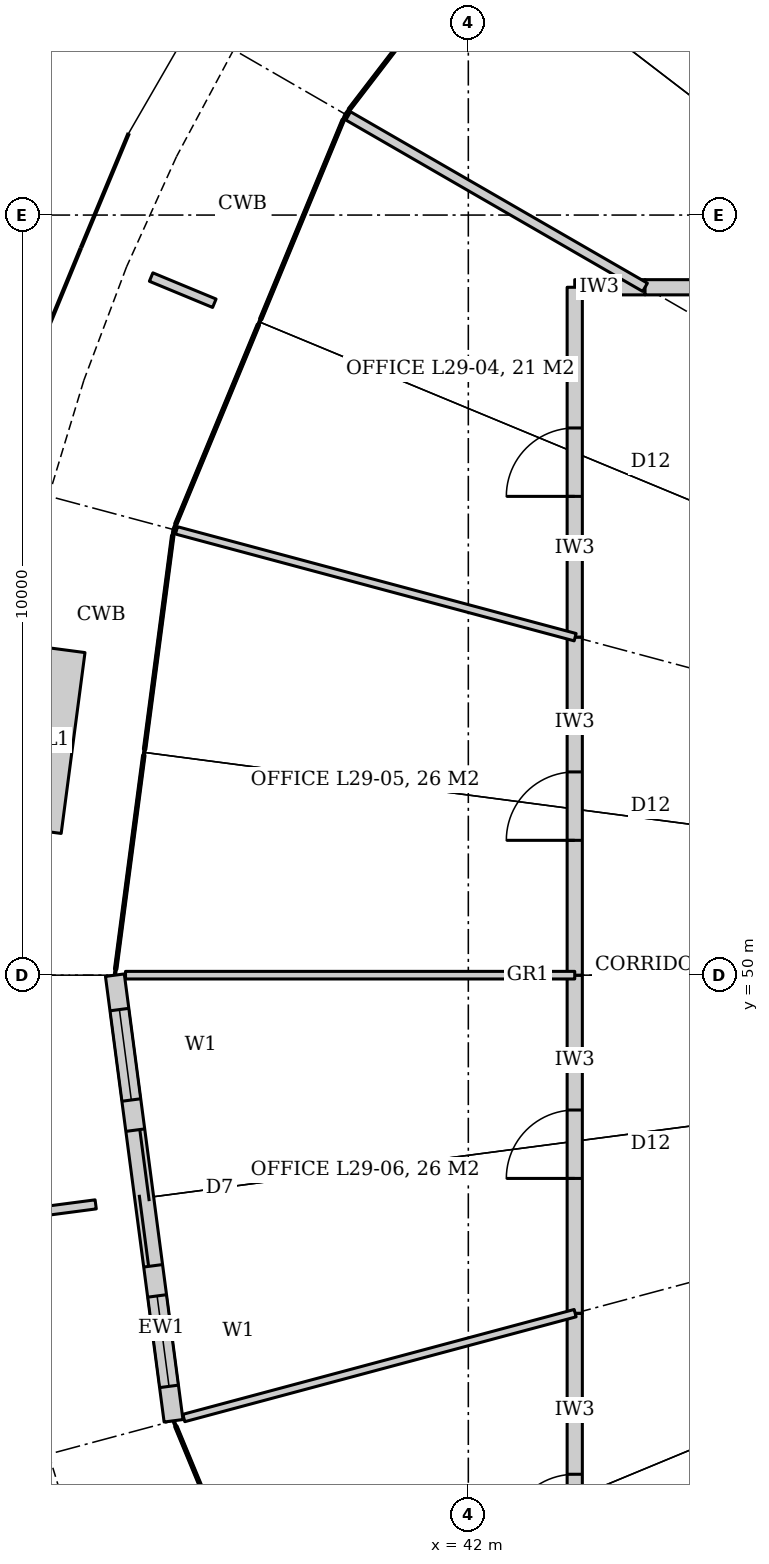
"""IFC4 building model, lengths in metres.
Left out: names, types, materials, properties, quantities, classifications, styles, units other than length and angle.
Written with IfcOpenShell. Run it as: python <this file> out.ifc"""

import sys

from ifc_helpers import new_model, si_unit, direction, frame, frame_2d, origin, place, context, subcontext, project, spatial, rectangle, extrude, element, fill, save


model = new_model("IFC4")
c1 = context("Model", 3, precision=1e-05, world=origin(), true_north=direction((0.0, 1.0)))
c2 = subcontext(c1, "Body", "Model", "MODEL_VIEW")
j1 = project(units=[si_unit("LENGTHUNIT", "METRE"), si_unit("PLANEANGLEUNIT", "RADIAN")], contexts=[c1])
p1 = place(None, origin())
s1 = spatial("IfcSite", under=j1, at=p1, CompositionType="ELEMENT")
p2 = place(p1, origin())
s2 = spatial("IfcBuilding", under=s1, at=p2, CompositionType="ELEMENT")
p3 = place(p2, frame((0.0, 0.0, 122.6)))
s3 = spatial("IfcBuildingStorey", under=s2, at=p3, CompositionType="ELEMENT", Elevation=122.6)
p4 = place(p3, frame((43.4, 59.05, 0.0), z_axis=(0.0, 0.0, 1.0), x_axis=(1.0, 0.0, 0.0)))
e1 = element("IfcWall", 1, at=p4, inside=s3, PredefinedType="PARTITIONING", context=c2, shape_type="SweptSolid", body=[
    extrude(rectangle(XDim=0.925, YDim=0.2, at=frame_2d((0.462, 0.0))), origin(), (0.0, 0.0, 1.0), 3.04),
])
p5 = place(p3, frame((44.325, 59.05, 0.0), z_axis=(0.0, 0.0, 1.0), x_axis=(1.0, 0.0, 0.0)))
e2 = element("IfcWall", 2, at=p5, inside=s3, PredefinedType="PARTITIONING", context=c2, shape_type="SweptSolid", body=[
    extrude(rectangle(XDim=10.45, YDim=0.2, at=frame_2d((5.225, 0.0))), origin(), (0.0, 0.0, 1.0), 3.02),
])
p6 = place(p5, frame((4.725, 0.0, 0.0)))
e3 = element("IfcOpeningElement", 3, at=p6, cuts=e2, PredefinedType="OPENING", context=c2, shape_type="SweptSolid", body=[
    extrude(rectangle(XDim=1.0, YDim=2.4, at=frame_2d((0.5, 1.2))), frame((0.0, 0.11, 0.0), z_axis=(0.0, -1.0, 0.0), x_axis=(1.0, 0.0, 0.0)), (0.0, 0.0, 1.0), 0.22),
])
p7 = place(p3, frame((43.4, 40.416, 0.0), z_axis=(0.0, 0.0, 1.0), x_axis=(0.0, 1.0, 0.0)))
e4 = element("IfcWall", 4, at=p7, inside=s3, PredefinedType="PARTITIONING", context=c2, shape_type="SweptSolid", body=[
    extrude(rectangle(XDim=5.136, YDim=0.2, at=frame_2d((2.568, 0.0))), origin(), (0.0, 0.0, 1.0), 3.04),
])
p8 = place(p7, frame((2.118, 0.0, 0.0)))
e5 = element("IfcOpeningElement", 5, at=p8, cuts=e4, PredefinedType="OPENING", context=c2, shape_type="SweptSolid", body=[
    extrude(rectangle(XDim=0.9, YDim=2.4, at=frame_2d((0.45, 1.2))), frame((0.0, 0.11, 0.0), z_axis=(0.0, -1.0, 0.0), x_axis=(1.0, 0.0, 0.0)), (0.0, 0.0, 1.0), 0.22),
])
p9 = place(p3, frame((43.4, 45.552, 0.0), z_axis=(0.0, 0.0, 1.0), x_axis=(0.0, 1.0, 0.0)))
e6 = element("IfcWall", 6, at=p9, inside=s3, PredefinedType="PARTITIONING", context=c2, shape_type="SweptSolid", body=[
    extrude(rectangle(XDim=4.448, YDim=0.2, at=frame_2d((2.224, 0.0))), origin(), (0.0, 0.0, 1.0), 3.04),
])
p10 = place(p9, frame((1.774, 0.0, 0.0)))
e7 = element("IfcOpeningElement", 7, at=p10, cuts=e6, PredefinedType="OPENING", context=c2, shape_type="SweptSolid", body=[
    extrude(rectangle(XDim=0.9, YDim=2.4, at=frame_2d((0.45, 1.2))), frame((0.0, 0.11, 0.0), z_axis=(0.0, -1.0, 0.0), x_axis=(1.0, 0.0, 0.0)), (0.0, 0.0, 1.0), 0.22),
])
p11 = place(p3, frame((43.4, 50.0, 0.0), z_axis=(0.0, 0.0, 1.0), x_axis=(0.0, 1.0, 0.0)))
e8 = element("IfcWall", 8, at=p11, inside=s3, PredefinedType="PARTITIONING", context=c2, shape_type="SweptSolid", body=[
    extrude(rectangle(XDim=4.448, YDim=0.2, at=frame_2d((2.224, 0.0))), origin(), (0.0, 0.0, 1.0), 3.04),
])
p12 = place(p11, frame((1.774, 0.0, 0.0)))
e9 = element("IfcOpeningElement", 9, at=p12, cuts=e8, PredefinedType="OPENING", context=c2, shape_type="SweptSolid", body=[
    extrude(rectangle(XDim=0.9, YDim=2.4, at=frame_2d((0.45, 1.2))), frame((0.0, 0.11, 0.0), z_axis=(0.0, -1.0, 0.0), x_axis=(1.0, 0.0, 0.0)), (0.0, 0.0, 1.0), 0.22),
])
p13 = place(p3, frame((43.4, 54.448, 0.0), z_axis=(0.0, 0.0, 1.0), x_axis=(0.0, 1.0, 0.0)))
e10 = element("IfcWall", 10, at=p13, inside=s3, PredefinedType="PARTITIONING", context=c2, shape_type="SweptSolid", body=[
    extrude(rectangle(XDim=4.602, YDim=0.2, at=frame_2d((2.301, 0.0))), origin(), (0.0, 0.0, 1.0), 3.04),
])
p14 = place(p13, frame((1.851, 0.0, 0.0)))
e11 = element("IfcOpeningElement", 11, at=p14, cuts=e10, PredefinedType="OPENING", context=c2, shape_type="SweptSolid", body=[
    extrude(rectangle(XDim=0.9, YDim=2.4, at=frame_2d((0.45, 1.2))), frame((0.0, 0.11, 0.0), z_axis=(0.0, -1.0, 0.0), x_axis=(1.0, 0.0, 0.0)), (0.0, 0.0, 1.0), 0.22),
])
p15 = place(p3, frame((44.325, 59.05, 0.0), z_axis=(0.0, 0.0, 1.0), x_axis=(-0.866034781647, 0.499983756713, 0.0)))
e12 = element("IfcWall", 12, at=p15, inside=s3, PredefinedType="PARTITIONING", context=c2, shape_type="SweptSolid", body=[
    extrude(rectangle(XDim=4.61, YDim=0.125, at=frame_2d((2.305, 0.0))), origin(), (0.0, 0.0, 1.0), 3.04),
])
p16 = place(p3, frame((43.406, 54.447, 0.0), z_axis=(0.0, 0.0, 1.0), x_axis=(-0.965933864203, 0.258789045336, 0.0)))
e13 = element("IfcWall", 13, at=p16, inside=s3, PredefinedType="PARTITIONING", context=c2, shape_type="SweptSolid", body=[
    extrude(rectangle(XDim=5.53, YDim=0.1, at=frame_2d((2.765, 0.0))), origin(), (0.0, 0.0, 1.0), 3.04),
])
p17 = place(p3, frame((43.4, 50.0, 0.0), z_axis=(0.0, 0.0, 1.0), x_axis=(-1.0, 0.0, 0.0)))
e14 = element("IfcWall", 14, at=p17, inside=s3, PredefinedType="PARTITIONING", context=c2, shape_type="SweptSolid", body=[
    extrude(rectangle(XDim=6.01, YDim=0.1, at=frame_2d((3.005, 0.0))), origin(), (0.0, 0.0, 1.0), 3.04),
])
p18 = place(p3, frame((43.406, 45.553, 0.0), z_axis=(0.0, 0.0, 1.0), x_axis=(-0.965932799886, -0.258793017881, 0.0)))
e15 = element("IfcWall", 15, at=p18, inside=s3, PredefinedType="PARTITIONING", context=c2, shape_type="SweptSolid", body=[
    extrude(rectangle(XDim=5.43, YDim=0.1, at=frame_2d((2.715, 0.0))), origin(), (0.0, 0.0, 1.0), 3.04),
])
p19 = place(p3, frame((37.25, 50.0, 0.0), z_axis=(0.0, 0.0, 1.0), x_axis=(0.130518315254, -0.991445898364, 0.0)))
e16 = element("IfcWall", 16, at=p19, inside=s3, PredefinedType="SOLIDWALL", context=c2, shape_type="SweptSolid", body=[
    extrude(rectangle(XDim=5.939, YDim=0.25, at=frame_2d((2.969, 0.0))), origin(), (0.0, 0.0, 1.0), 4.04),
])
p20 = place(p19, frame((2.07, 0.0, 0.0)))
e17 = element("IfcOpeningElement", 17, at=p20, cuts=e16, PredefinedType="OPENING", context=c2, shape_type="SweptSolid", body=[
    extrude(rectangle(XDim=1.8, YDim=2.4, at=frame_2d((0.9, 1.2))), frame((0.0, 0.135, 0.0), z_axis=(0.0, -1.0, 0.0), x_axis=(1.0, 0.0, 0.0)), (0.0, 0.0, 1.0), 0.27),
])
p21 = place(p19, frame((0.469, 0.0, 0.0)))
e18 = element("IfcOpeningElement", 18, at=p21, cuts=e16, PredefinedType="OPENING", context=c2, shape_type="SweptSolid", body=[
    extrude(rectangle(XDim=1.2, YDim=2.4, at=frame_2d((0.6, 1.2))), frame((0.0, 0.135, 0.0), z_axis=(0.0, -1.0, 0.0), x_axis=(1.0, 0.0, 0.0)), (0.0, 0.0, 1.0), 0.27),
])
p22 = place(p19, frame((4.27, 0.0, 0.0)))
e19 = element("IfcOpeningElement", 19, at=p22, cuts=e16, PredefinedType="OPENING", context=c2, shape_type="SweptSolid", body=[
    extrude(rectangle(XDim=1.2, YDim=2.4, at=frame_2d((0.6, 1.2))), frame((0.0, 0.135, 0.0), z_axis=(0.0, -1.0, 0.0), x_axis=(1.0, 0.0, 0.0)), (0.0, 0.0, 1.0), 0.27),
])
p23 = place(p14, origin())
e20 = element("IfcDoor", 20, at=p23, inside=s3, OperationType="SINGLE_SWING_LEFT", PredefinedType="DOOR", context=c2, shape_type="SweptSolid", body=[
    extrude(rectangle(XDim=0.9, YDim=2.4, at=frame_2d((0.45, 1.2))), frame((0.0, 0.025, 0.0), z_axis=(0.0, -1.0, 0.0), x_axis=(1.0, 0.0, 0.0)), (0.0, 0.0, 1.0), 0.05),
])
fill(e11, e20)
p24 = place(p12, origin())
e21 = element("IfcDoor", 21, at=p24, inside=s3, OperationType="SINGLE_SWING_LEFT", PredefinedType="DOOR", context=c2, shape_type="SweptSolid", body=[
    extrude(rectangle(XDim=0.9, YDim=2.4, at=frame_2d((0.45, 1.2))), frame((0.0, 0.025, 0.0), z_axis=(0.0, -1.0, 0.0), x_axis=(1.0, 0.0, 0.0)), (0.0, 0.0, 1.0), 0.05),
])
fill(e9, e21)
p25 = place(p10, origin())
e22 = element("IfcDoor", 22, at=p25, inside=s3, OperationType="SINGLE_SWING_LEFT", PredefinedType="DOOR", context=c2, shape_type="SweptSolid", body=[
    extrude(rectangle(XDim=0.9, YDim=2.4, at=frame_2d((0.45, 1.2))), frame((0.0, 0.025, 0.0), z_axis=(0.0, -1.0, 0.0), x_axis=(1.0, 0.0, 0.0)), (0.0, 0.0, 1.0), 0.05),
])
fill(e7, e22)
p26 = place(p8, origin())
e23 = element("IfcDoor", 23, at=p26, inside=s3, OperationType="SINGLE_SWING_LEFT", PredefinedType="DOOR", context=c2, shape_type="SweptSolid", body=[
    extrude(rectangle(XDim=0.9, YDim=2.4, at=frame_2d((0.45, 1.2))), frame((0.0, 0.025, 0.0), z_axis=(0.0, -1.0, 0.0), x_axis=(1.0, 0.0, 0.0)), (0.0, 0.0, 1.0), 0.05),
])
fill(e5, e23)
p27 = place(p20, origin())
e24 = element("IfcDoor", 24, at=p27, inside=s3, OperationType="DOUBLE_DOOR_SLIDING", PredefinedType="DOOR", context=c2, shape_type="SweptSolid", body=[
    extrude(rectangle(XDim=1.8, YDim=2.4, at=frame_2d((0.9, 1.2))), frame((0.0, 0.025, 0.0), z_axis=(0.0, -1.0, 0.0), x_axis=(1.0, 0.0, 0.0)), (0.0, 0.0, 1.0), 0.05),
])
fill(e17, e24)
p28 = place(p21, origin())
e25 = element("IfcWindow", 25, at=p28, inside=s3, PartitioningType="SINGLE_PANEL", PredefinedType="WINDOW", context=c2, shape_type="SweptSolid", body=[
    extrude(rectangle(XDim=1.2, YDim=2.4, at=frame_2d((0.6, 1.2))), frame((0.0, 0.03, 0.0), z_axis=(0.0, -1.0, 0.0), x_axis=(1.0, 0.0, 0.0)), (0.0, 0.0, 1.0), 0.06),
])
fill(e18, e25)
p29 = place(p22, origin())
e26 = element("IfcWindow", 26, at=p29, inside=s3, PartitioningType="SINGLE_PANEL", PredefinedType="WINDOW", context=c2, shape_type="SweptSolid", body=[
    extrude(rectangle(XDim=1.2, YDim=2.4, at=frame_2d((0.6, 1.2))), frame((0.0, 0.03, 0.0), z_axis=(0.0, -1.0, 0.0), x_axis=(1.0, 0.0, 0.0)), (0.0, 0.0, 1.0), 0.06),
])
fill(e19, e26)
save(model, sys.argv[1])
